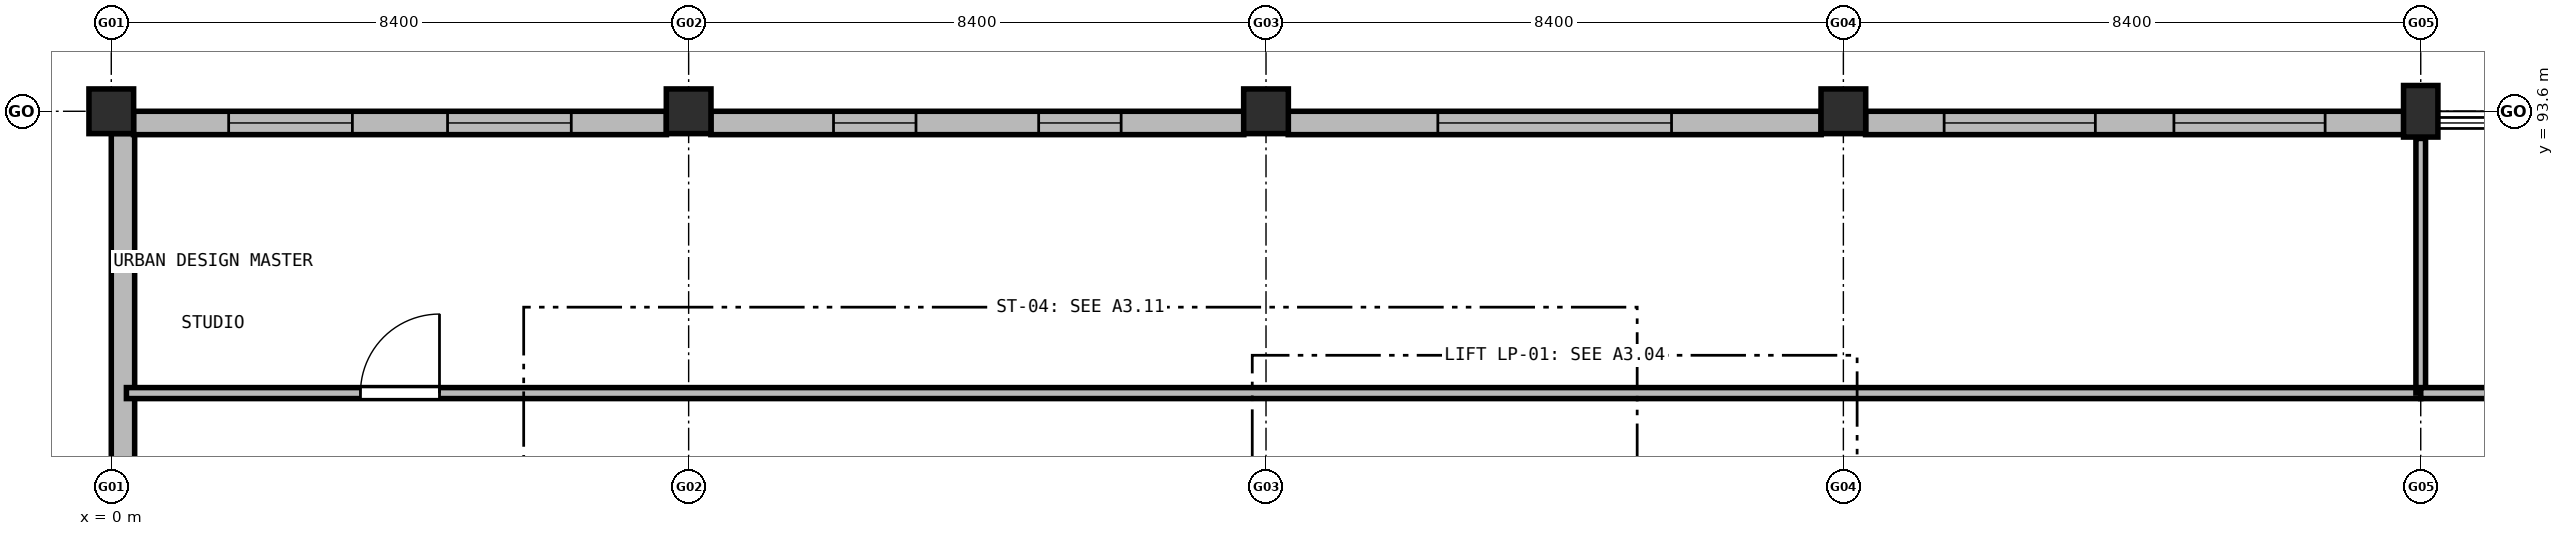
"""IFC4 building model, lengths in metres.
Left out: names, types, materials, properties, quantities, classifications, styles, units other than length and angle.
Written with IfcOpenShell. Run it as: python <this file> out.ifc"""

import sys

from ifc_helpers import new_model, si_unit, direction, frame, frame_2d, origin, origin_2d, place, context, subcontext, project, spatial, rectangle, extrude, element, fill, save


model = new_model("IFC4")
c1 = context("Model", 3, precision=1e-05, world=origin(), true_north=direction((0.0, 1.0)))
c2 = subcontext(c1, "Body", "Model", "MODEL_VIEW")
j1 = project(units=[si_unit("LENGTHUNIT", "METRE"), si_unit("PLANEANGLEUNIT", "RADIAN")], contexts=[c1])
p1 = place(None, origin())
s1 = spatial("IfcSite", under=j1, at=p1, CompositionType="ELEMENT")
p2 = place(p1, origin())
s2 = spatial("IfcBuilding", under=s1, at=p2, CompositionType="ELEMENT")
p3 = place(p2, frame((0.0, 0.0, 9.3)))
s3 = spatial("IfcBuildingStorey", under=s2, at=p3, CompositionType="ELEMENT", Elevation=9.3)
for number, where, z_axis, x_axis in (
    (1, (0.0, 93.6, 0.0), (0.0, 0.0, 1.0), (1.0, 0.0, 0.0)),
    (2, (8.4, 93.6, 0.0), (0.0, 0.0, 1.0), (1.0, 0.0, 0.0)),
    (3, (16.8, 93.6, 0.0), (0.0, 0.0, 1.0), (1.0, 0.0, 0.0)),
    (4, (25.2, 93.6, 0.0), (0.0, 0.0, 1.0), (1.0, 0.0, 0.0)),
):
    element("IfcColumn", number, at=place(p3, frame(where, z_axis=z_axis, x_axis=x_axis)), inside=s3, PredefinedType="COLUMN", context=c2, shape_type="SweptSolid", body=[
        extrude(rectangle(XDim=0.65, YDim=0.65, at=origin_2d()), origin(), (0.0, 0.0, 1.0), 4.2),
    ])
p4 = place(p3, frame((33.6, 93.6, 0.0), z_axis=(0.0, 0.0, 1.0), x_axis=(1.0, 0.0, 0.0)))
e5 = element("IfcColumn", 5, at=p4, inside=s3, PredefinedType="COLUMN", context=c2, shape_type="SweptSolid", body=[
    extrude(rectangle(XDim=0.5, YDim=0.75, at=origin_2d()), origin(), (0.0, 0.0, 1.0), 4.2),
])
p5 = place(p3, frame((0.17, 86.723, 0.0), z_axis=(0.0, 0.0, 1.0), x_axis=(0.0, 1.0, 0.0)))
e6 = element("IfcWall", 6, at=p5, inside=s3, PredefinedType="SOLIDWALL", context=c2, shape_type="SweptSolid", body=[
    extrude(rectangle(XDim=6.554, YDim=0.34, at=frame_2d((3.277, 0.0))), origin(), (0.0, 0.0, 1.0), 3.33),
])
p6 = place(p3, frame((0.323, 93.43, 0.0), z_axis=(0.0, 0.0, 1.0), x_axis=(1.0, 0.0, 0.0)))
e7 = element("IfcWall", 7, at=p6, inside=s3, PredefinedType="SOLIDWALL", context=c2, shape_type="SweptSolid", body=[
    extrude(rectangle(XDim=7.754, YDim=0.34, at=frame_2d((3.877, 0.0))), origin(), (0.0, 0.0, 1.0), 3.18),
])
p7 = place(p6, frame((1.385, 0.0, 0.95)))
e8 = element("IfcOpeningElement", 8, at=p7, cuts=e7, PredefinedType="OPENING", context=c2, shape_type="SweptSolid", body=[
    extrude(rectangle(XDim=1.8, YDim=1.5, at=frame_2d((0.9, 0.75))), frame((0.0, 0.18, 0.0), z_axis=(0.0, -1.0, 0.0), x_axis=(1.0, 0.0, 0.0)), (0.0, 0.0, 1.0), 0.36),
])
p8 = place(p6, frame((4.569, 0.0, 0.95)))
e9 = element("IfcOpeningElement", 9, at=p8, cuts=e7, PredefinedType="OPENING", context=c2, shape_type="SweptSolid", body=[
    extrude(rectangle(XDim=1.8, YDim=1.5, at=frame_2d((0.9, 0.75))), frame((0.0, 0.18, 0.0), z_axis=(0.0, -1.0, 0.0), x_axis=(1.0, 0.0, 0.0)), (0.0, 0.0, 1.0), 0.36),
])
p9 = place(p3, frame((8.723, 93.43, 0.0), z_axis=(0.0, 0.0, 1.0), x_axis=(1.0, 0.0, 0.0)))
e10 = element("IfcWall", 10, at=p9, inside=s3, PredefinedType="SOLIDWALL", context=c2, shape_type="SweptSolid", body=[
    extrude(rectangle(XDim=7.754, YDim=0.34, at=frame_2d((3.877, 0.0))), origin(), (0.0, 0.0, 1.0), 3.18),
])
p10 = place(p9, frame((1.785, 0.0, 0.95)))
e11 = element("IfcOpeningElement", 11, at=p10, cuts=e10, PredefinedType="OPENING", context=c2, shape_type="SweptSolid", body=[
    extrude(rectangle(XDim=1.2, YDim=1.4, at=frame_2d((0.6, 0.7))), frame((0.0, 0.18, 0.0), z_axis=(0.0, -1.0, 0.0), x_axis=(1.0, 0.0, 0.0)), (0.0, 0.0, 1.0), 0.36),
])
p11 = place(p9, frame((4.769, 0.0, 0.95)))
e12 = element("IfcOpeningElement", 12, at=p11, cuts=e10, PredefinedType="OPENING", context=c2, shape_type="SweptSolid", body=[
    extrude(rectangle(XDim=1.2, YDim=1.4, at=frame_2d((0.6, 0.7))), frame((0.0, 0.18, 0.0), z_axis=(0.0, -1.0, 0.0), x_axis=(1.0, 0.0, 0.0)), (0.0, 0.0, 1.0), 0.36),
])
p12 = place(p3, frame((17.123, 93.43, 0.0), z_axis=(0.0, 0.0, 1.0), x_axis=(1.0, 0.0, 0.0)))
e13 = element("IfcWall", 13, at=p12, inside=s3, PredefinedType="SOLIDWALL", context=c2, shape_type="SweptSolid", body=[
    extrude(rectangle(XDim=7.754, YDim=0.34, at=frame_2d((3.877, 0.0))), origin(), (0.0, 0.0, 1.0), 3.18),
])
p13 = place(p12, frame((2.177, 0.0, 0.95)))
e14 = element("IfcOpeningElement", 14, at=p13, cuts=e13, PredefinedType="OPENING", context=c2, shape_type="SweptSolid", body=[
    extrude(rectangle(XDim=3.4, YDim=1.8, at=frame_2d((1.7, 0.9))), frame((0.0, 0.18, 0.0), z_axis=(0.0, -1.0, 0.0), x_axis=(1.0, 0.0, 0.0)), (0.0, 0.0, 1.0), 0.36),
])
p14 = place(p3, frame((25.523, 93.43, 0.0), z_axis=(0.0, 0.0, 1.0), x_axis=(1.0, 0.0, 0.0)))
e15 = element("IfcWall", 15, at=p14, inside=s3, PredefinedType="SOLIDWALL", context=c2, shape_type="SweptSolid", body=[
    extrude(rectangle(XDim=7.829, YDim=0.34, at=frame_2d((3.915, 0.0))), origin(), (0.0, 0.0, 1.0), 3.18),
])
p15 = place(p14, frame((1.143, 0.0, 0.95)))
e16 = element("IfcOpeningElement", 16, at=p15, cuts=e15, PredefinedType="OPENING", context=c2, shape_type="SweptSolid", body=[
    extrude(rectangle(XDim=2.2, YDim=1.7, at=frame_2d((1.1, 0.85))), frame((0.0, 0.18, 0.0), z_axis=(0.0, -1.0, 0.0), x_axis=(1.0, 0.0, 0.0)), (0.0, 0.0, 1.0), 0.36),
])
p16 = place(p14, frame((4.486, 0.0, 0.95)))
e17 = element("IfcOpeningElement", 17, at=p16, cuts=e15, PredefinedType="OPENING", context=c2, shape_type="SweptSolid", body=[
    extrude(rectangle(XDim=2.2, YDim=1.7, at=frame_2d((1.1, 0.85))), frame((0.0, 0.18, 0.0), z_axis=(0.0, -1.0, 0.0), x_axis=(1.0, 0.0, 0.0)), (0.0, 0.0, 1.0), 0.36),
])
p17 = place(p3, frame((0.22, 89.5, 0.0), z_axis=(0.0, 0.0, 1.0), x_axis=(1.0, 0.0, 0.0)))
e18 = element("IfcWall", 18, at=p17, inside=s3, PredefinedType="PARTITIONING", context=c2, shape_type="SweptSolid", body=[
    extrude(rectangle(XDim=33.38, YDim=0.16, at=frame_2d((16.69, 0.0))), origin(), (0.0, 0.0, 1.0), 3.325),
])
p18 = place(p17, frame((3.405, 0.0, 0.0)))
e19 = element("IfcOpeningElement", 19, at=p18, cuts=e18, PredefinedType="OPENING", context=c2, shape_type="SweptSolid", body=[
    extrude(rectangle(XDim=1.15, YDim=2.15, at=frame_2d((0.575, 1.075))), frame((0.0, 0.09, 0.0), z_axis=(0.0, -1.0, 0.0), x_axis=(1.0, 0.0, 0.0)), (0.0, 0.0, 1.0), 0.18),
])
p19 = place(p3, frame((33.6, 89.5, 0.0), z_axis=(0.0, 0.0, 1.0), x_axis=(0.0, 1.0, 0.0)))
e20 = element("IfcWall", 20, at=p19, inside=s3, PredefinedType="PARTITIONING", context=c2, shape_type="SweptSolid", body=[
    extrude(rectangle(XDim=3.705, YDim=0.14, at=frame_2d((1.853, 0.0))), origin(), (0.0, 0.0, 1.0), 3.175),
])
p20 = place(p3, frame((33.6, 89.5, 0.0), z_axis=(0.0, 0.0, 1.0), x_axis=(1.0, 0.0, 0.0)))
e21 = element("IfcWall", 21, at=p20, inside=s3, PredefinedType="PARTITIONING", context=c2, shape_type="SweptSolid", body=[
    extrude(rectangle(XDim=33.6, YDim=0.16, at=frame_2d((16.8, 0.0))), origin(), (0.0, 0.0, 1.0), 3.325),
])
p21 = place(p20, frame((3.375, 0.0, 0.0)))
e22 = element("IfcOpeningElement", 22, at=p21, cuts=e21, PredefinedType="OPENING", context=c2, shape_type="SweptSolid", body=[
    extrude(rectangle(XDim=1.65, YDim=2.2, at=frame_2d((0.825, 1.1))), frame((0.0, 0.09, 0.0), z_axis=(0.0, -1.0, 0.0), x_axis=(1.0, 0.0, 0.0)), (0.0, 0.0, 1.0), 0.18),
])
p22 = place(p7, origin())
e23 = element("IfcWindow", 23, at=p22, inside=s3, PartitioningType="SINGLE_PANEL", PredefinedType="WINDOW", context=c2, shape_type="SweptSolid", body=[
    extrude(rectangle(XDim=1.8, YDim=1.5, at=frame_2d((0.9, 0.75))), frame((0.0, 0.03, 0.0), z_axis=(0.0, -1.0, 0.0), x_axis=(1.0, 0.0, 0.0)), (0.0, 0.0, 1.0), 0.06),
])
fill(e8, e23)
p23 = place(p8, origin())
e24 = element("IfcWindow", 24, at=p23, inside=s3, PartitioningType="SINGLE_PANEL", PredefinedType="WINDOW", context=c2, shape_type="SweptSolid", body=[
    extrude(rectangle(XDim=1.8, YDim=1.5, at=frame_2d((0.9, 0.75))), frame((0.0, 0.03, 0.0), z_axis=(0.0, -1.0, 0.0), x_axis=(1.0, 0.0, 0.0)), (0.0, 0.0, 1.0), 0.06),
])
fill(e9, e24)
p24 = place(p10, origin())
e25 = element("IfcWindow", 25, at=p24, inside=s3, PartitioningType="SINGLE_PANEL", PredefinedType="WINDOW", context=c2, shape_type="SweptSolid", body=[
    extrude(rectangle(XDim=1.2, YDim=1.4, at=frame_2d((0.6, 0.7))), frame((0.0, 0.03, 0.0), z_axis=(0.0, -1.0, 0.0), x_axis=(1.0, 0.0, 0.0)), (0.0, 0.0, 1.0), 0.06),
])
fill(e11, e25)
p25 = place(p11, origin())
e26 = element("IfcWindow", 26, at=p25, inside=s3, PartitioningType="SINGLE_PANEL", PredefinedType="WINDOW", context=c2, shape_type="SweptSolid", body=[
    extrude(rectangle(XDim=1.2, YDim=1.4, at=frame_2d((0.6, 0.7))), frame((0.0, 0.03, 0.0), z_axis=(0.0, -1.0, 0.0), x_axis=(1.0, 0.0, 0.0)), (0.0, 0.0, 1.0), 0.06),
])
fill(e12, e26)
p26 = place(p13, origin())
e27 = element("IfcWindow", 27, at=p26, inside=s3, PartitioningType="SINGLE_PANEL", PredefinedType="WINDOW", context=c2, shape_type="SweptSolid", body=[
    extrude(rectangle(XDim=3.4, YDim=1.8, at=frame_2d((1.7, 0.9))), frame((0.0, 0.03, 0.0), z_axis=(0.0, -1.0, 0.0), x_axis=(1.0, 0.0, 0.0)), (0.0, 0.0, 1.0), 0.06),
])
fill(e14, e27)
p27 = place(p15, origin())
e28 = element("IfcWindow", 28, at=p27, inside=s3, PartitioningType="SINGLE_PANEL", PredefinedType="WINDOW", context=c2, shape_type="SweptSolid", body=[
    extrude(rectangle(XDim=2.2, YDim=1.7, at=frame_2d((1.1, 0.85))), frame((0.0, 0.03, 0.0), z_axis=(0.0, -1.0, 0.0), x_axis=(1.0, 0.0, 0.0)), (0.0, 0.0, 1.0), 0.06),
])
fill(e16, e28)
p28 = place(p16, origin())
e29 = element("IfcWindow", 29, at=p28, inside=s3, PartitioningType="SINGLE_PANEL", PredefinedType="WINDOW", context=c2, shape_type="SweptSolid", body=[
    extrude(rectangle(XDim=2.2, YDim=1.7, at=frame_2d((1.1, 0.85))), frame((0.0, 0.03, 0.0), z_axis=(0.0, -1.0, 0.0), x_axis=(1.0, 0.0, 0.0)), (0.0, 0.0, 1.0), 0.06),
])
fill(e17, e29)
p29 = place(p18, origin())
e30 = element("IfcDoor", 30, at=p29, inside=s3, OperationType="SINGLE_SWING_RIGHT", PredefinedType="DOOR", context=c2, shape_type="SweptSolid", body=[
    extrude(rectangle(XDim=1.15, YDim=2.15, at=frame_2d((0.575, 1.075))), frame((0.0, 0.025, 0.0), z_axis=(0.0, -1.0, 0.0), x_axis=(1.0, 0.0, 0.0)), (0.0, 0.0, 1.0), 0.05),
])
fill(e19, e30)
save(model, sys.argv[1])
